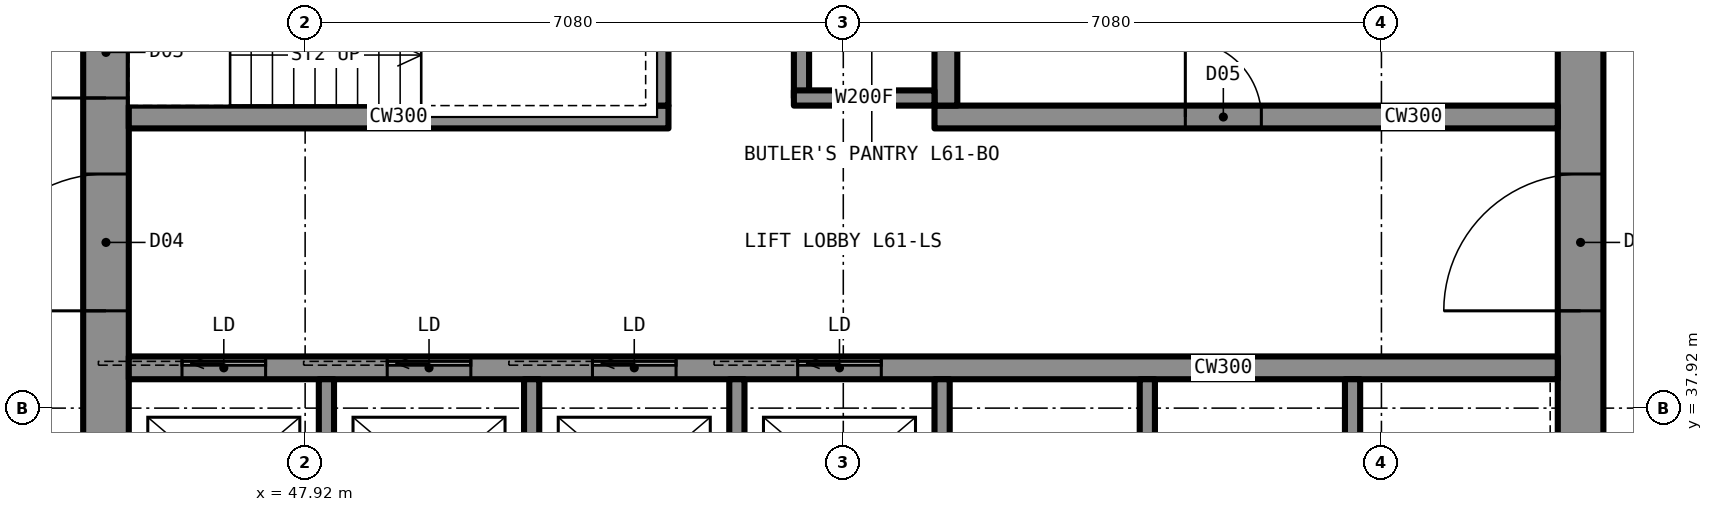
"""IFC4 building model, lengths in metres.
Left out: names, types, materials, properties, quantities, classifications, styles, units other than length and angle.
Written with IfcOpenShell. Run it as: python <this file> out.ifc"""

import sys

from ifc_helpers import new_model, si_unit, direction, frame, frame_2d, origin, place, context, subcontext, project, spatial, rectangle, extrude, element, fill, save


model = new_model("IFC4")
c1 = context("Model", 3, precision=1e-05, world=origin(), true_north=direction((0.0, 1.0)))
c2 = subcontext(c1, "Body", "Model", "MODEL_VIEW")
j1 = project(units=[si_unit("LENGTHUNIT", "METRE"), si_unit("PLANEANGLEUNIT", "RADIAN")], contexts=[c1])
p1 = place(None, origin())
s1 = spatial("IfcSite", under=j1, at=p1, CompositionType="ELEMENT")
p2 = place(p1, origin())
s2 = spatial("IfcBuilding", under=s1, at=p2, CompositionType="ELEMENT")
p3 = place(p2, frame((0.0, 0.0, 226.7)))
s3 = spatial("IfcBuildingStorey", under=s2, at=p3, CompositionType="ELEMENT", Elevation=226.7)
p4 = place(p3, frame((64.7, 35.6, 0.0), z_axis=(0.0, 0.0, 1.0), x_axis=(0.0, 1.0, 0.0)))
e1 = element("IfcWall", 1, at=p4, inside=s3, PredefinedType="SHEAR", context=c2, shape_type="SweptSolid", body=[
    extrude(rectangle(XDim=18.8, YDim=0.6, at=frame_2d((9.4, 0.0))), origin(), (0.0, 0.0, 1.0), 3.5),
])
p5 = place(p4, frame((13.4, 0.0, 0.0)))
e2 = element("IfcOpeningElement", 2, at=p5, cuts=e1, PredefinedType="OPENING", context=c2, shape_type="SweptSolid", body=[
    extrude(rectangle(XDim=1.8, YDim=2.2, at=frame_2d((0.9, 1.1))), frame((0.0, 0.31, 0.0), z_axis=(0.0, -1.0, 0.0), x_axis=(1.0, 0.0, 0.0)), (0.0, 0.0, 1.0), 0.62),
])
p6 = place(p4, frame((3.6, 0.0, 0.0)))
e3 = element("IfcOpeningElement", 3, at=p6, cuts=e1, PredefinedType="OPENING", context=c2, shape_type="SweptSolid", body=[
    extrude(rectangle(XDim=1.8, YDim=2.2, at=frame_2d((0.9, 1.1))), frame((0.0, 0.31, 0.0), z_axis=(0.0, -1.0, 0.0), x_axis=(1.0, 0.0, 0.0)), (0.0, 0.0, 1.0), 0.62),
])
p7 = place(p3, frame((45.3, 35.6, 0.0), z_axis=(0.0, 0.0, 1.0), x_axis=(0.0, 1.0, 0.0)))
e4 = element("IfcWall", 4, at=p7, inside=s3, PredefinedType="SHEAR", context=c2, shape_type="SweptSolid", body=[
    extrude(rectangle(XDim=18.8, YDim=0.6, at=frame_2d((9.4, 0.0))), origin(), (0.0, 0.0, 1.0), 3.5),
])
p8 = place(p7, frame((13.4, 0.0, 0.0)))
e5 = element("IfcOpeningElement", 5, at=p8, cuts=e4, PredefinedType="OPENING", context=c2, shape_type="SweptSolid", body=[
    extrude(rectangle(XDim=1.8, YDim=2.2, at=frame_2d((0.9, 1.1))), frame((0.0, 0.31, 0.0), z_axis=(0.0, -1.0, 0.0), x_axis=(1.0, 0.0, 0.0)), (0.0, 0.0, 1.0), 0.62),
])
p9 = place(p7, frame((3.6, 0.0, 0.0)))
e6 = element("IfcOpeningElement", 6, at=p9, cuts=e4, PredefinedType="OPENING", context=c2, shape_type="SweptSolid", body=[
    extrude(rectangle(XDim=1.8, YDim=2.2, at=frame_2d((0.9, 1.1))), frame((0.0, 0.31, 0.0), z_axis=(0.0, -1.0, 0.0), x_axis=(1.0, 0.0, 0.0)), (0.0, 0.0, 1.0), 0.62),
])
p10 = place(p7, frame((6.4, 0.0, 0.0)))
e7 = element("IfcOpeningElement", 7, at=p10, cuts=e4, PredefinedType="OPENING", context=c2, shape_type="SweptSolid", body=[
    extrude(rectangle(XDim=1.2, YDim=2.2, at=frame_2d((0.6, 1.1))), frame((0.0, 0.31, 0.0), z_axis=(0.0, -1.0, 0.0), x_axis=(1.0, 0.0, 0.0)), (0.0, 0.0, 1.0), 0.62),
])
p11 = place(p3, frame((45.6, 38.45, 0.0), z_axis=(0.0, 0.0, 1.0), x_axis=(1.0, 0.0, 0.0)))
e8 = element("IfcWall", 8, at=p11, inside=s3, PredefinedType="SHEAR", context=c2, shape_type="SweptSolid", body=[
    extrude(rectangle(XDim=18.8, YDim=0.3, at=frame_2d((9.4, 0.0))), origin(), (0.0, 0.0, 1.0), 3.5),
])
p12 = place(p11, frame((0.7, 0.0, 0.0)))
e9 = element("IfcOpeningElement", 9, at=p12, cuts=e8, PredefinedType="OPENING", context=c2, shape_type="SweptSolid", body=[
    extrude(rectangle(XDim=1.1, YDim=2.2, at=frame_2d((0.55, 1.1))), frame((0.0, 0.16, 0.0), z_axis=(0.0, -1.0, 0.0), x_axis=(1.0, 0.0, 0.0)), (0.0, 0.0, 1.0), 0.32),
])
p13 = place(p11, frame((3.4, 0.0, 0.0)))
e10 = element("IfcOpeningElement", 10, at=p13, cuts=e8, PredefinedType="OPENING", context=c2, shape_type="SweptSolid", body=[
    extrude(rectangle(XDim=1.1, YDim=2.2, at=frame_2d((0.55, 1.1))), frame((0.0, 0.16, 0.0), z_axis=(0.0, -1.0, 0.0), x_axis=(1.0, 0.0, 0.0)), (0.0, 0.0, 1.0), 0.32),
])
p14 = place(p11, frame((6.1, 0.0, 0.0)))
e11 = element("IfcOpeningElement", 11, at=p14, cuts=e8, PredefinedType="OPENING", context=c2, shape_type="SweptSolid", body=[
    extrude(rectangle(XDim=1.1, YDim=2.2, at=frame_2d((0.55, 1.1))), frame((0.0, 0.16, 0.0), z_axis=(0.0, -1.0, 0.0), x_axis=(1.0, 0.0, 0.0)), (0.0, 0.0, 1.0), 0.32),
])
p15 = place(p11, frame((8.8, 0.0, 0.0)))
e12 = element("IfcOpeningElement", 12, at=p15, cuts=e8, PredefinedType="OPENING", context=c2, shape_type="SweptSolid", body=[
    extrude(rectangle(XDim=1.1, YDim=2.2, at=frame_2d((0.55, 1.1))), frame((0.0, 0.16, 0.0), z_axis=(0.0, -1.0, 0.0), x_axis=(1.0, 0.0, 0.0)), (0.0, 0.0, 1.0), 0.32),
])
p16 = place(p3, frame((45.6, 41.75, 0.0), z_axis=(0.0, 0.0, 1.0), x_axis=(1.0, 0.0, 0.0)))
e13 = element("IfcWall", 13, at=p16, inside=s3, PredefinedType="SHEAR", context=c2, shape_type="SweptSolid", body=[
    extrude(rectangle(XDim=7.1, YDim=0.3, at=frame_2d((3.55, 0.0))), origin(), (0.0, 0.0, 1.0), 3.5),
])
p17 = place(p3, frame((56.2, 41.75, 0.0), z_axis=(0.0, 0.0, 1.0), x_axis=(1.0, 0.0, 0.0)))
e14 = element("IfcWall", 14, at=p17, inside=s3, PredefinedType="SHEAR", context=c2, shape_type="SweptSolid", body=[
    extrude(rectangle(XDim=8.2, YDim=0.3, at=frame_2d((4.1, 0.0))), origin(), (0.0, 0.0, 1.0), 3.5),
])
p18 = place(p17, frame((3.3, 0.0, 0.0)))
e15 = element("IfcOpeningElement", 15, at=p18, cuts=e14, PredefinedType="OPENING", context=c2, shape_type="SweptSolid", body=[
    extrude(rectangle(XDim=1.0, YDim=2.1, at=frame_2d((0.5, 1.05))), frame((0.0, 0.16, 0.0), z_axis=(0.0, -1.0, 0.0), x_axis=(1.0, 0.0, 0.0)), (0.0, 0.0, 1.0), 0.32),
])
p19 = place(p3, frame((52.55, 41.9, 0.0), z_axis=(0.0, 0.0, 1.0), x_axis=(0.0, 1.0, 0.0)))
e16 = element("IfcWall", 16, at=p19, inside=s3, PredefinedType="SHEAR", context=c2, shape_type="SweptSolid", body=[
    extrude(rectangle(XDim=6.2, YDim=0.3, at=frame_2d((3.1, 0.0))), origin(), (0.0, 0.0, 1.0), 3.5),
])
p20 = place(p19, frame((4.125, 0.0, 0.0)))
e17 = element("IfcOpeningElement", 17, at=p20, cuts=e16, PredefinedType="OPENING", context=c2, shape_type="SweptSolid", body=[
    extrude(rectangle(XDim=1.2, YDim=2.2, at=frame_2d((0.6, 1.1))), frame((0.0, 0.16, 0.0), z_axis=(0.0, -1.0, 0.0), x_axis=(1.0, 0.0, 0.0)), (0.0, 0.0, 1.0), 0.32),
])
p21 = place(p3, frame((56.35, 41.9, 0.0), z_axis=(0.0, 0.0, 1.0), x_axis=(0.0, 1.0, 0.0)))
e18 = element("IfcWall", 18, at=p21, inside=s3, PredefinedType="SHEAR", context=c2, shape_type="SweptSolid", body=[
    extrude(rectangle(XDim=9.5, YDim=0.3, at=frame_2d((4.75, 0.0))), origin(), (0.0, 0.0, 1.0), 3.5),
])
p22 = place(p21, frame((7.1, 0.0, 0.0)))
e19 = element("IfcOpeningElement", 19, at=p22, cuts=e18, PredefinedType="OPENING", context=c2, shape_type="SweptSolid", body=[
    extrude(rectangle(XDim=1.8, YDim=2.2, at=frame_2d((0.9, 1.1))), frame((0.0, 0.16, 0.0), z_axis=(0.0, -1.0, 0.0), x_axis=(1.0, 0.0, 0.0)), (0.0, 0.0, 1.0), 0.32),
])
p23 = place(p3, frame((54.45, 42.0, 0.0), z_axis=(0.0, 0.0, 1.0), x_axis=(0.0, 1.0, 0.0)))
e20 = element("IfcWall", 20, at=p23, inside=s3, PredefinedType="PARTITIONING", context=c2, shape_type="SweptSolid", body=[
    extrude(rectangle(XDim=2.3, YDim=0.2, at=frame_2d((1.15, 0.0))), origin(), (0.0, 0.0, 1.0), 3.33),
])
p24 = place(p23, frame((0.65, 0.0, 0.0)))
e21 = element("IfcOpeningElement", 21, at=p24, cuts=e20, PredefinedType="OPENING", context=c2, shape_type="SweptSolid", body=[
    extrude(rectangle(XDim=1.0, YDim=2.1, at=frame_2d((0.5, 1.05))), frame((0.0, 0.11, 0.0), z_axis=(0.0, -1.0, 0.0), x_axis=(1.0, 0.0, 0.0)), (0.0, 0.0, 1.0), 0.22),
])
p25 = place(p3, frame((54.35, 42.0, 0.0), z_axis=(0.0, 0.0, 1.0), x_axis=(1.0, 0.0, 0.0)))
e22 = element("IfcWall", 22, at=p25, inside=s3, PredefinedType="PARTITIONING", context=c2, shape_type="SweptSolid", body=[
    extrude(rectangle(XDim=1.85, YDim=0.2, at=frame_2d((0.925, 0.0))), origin(), (0.0, 0.0, 1.0), 3.33),
])
for number, where, z_axis, x_axis in (
    (23, (48.2, 35.6, 0.0), (0.0, 0.0, 1.0), (0.0, 1.0, 0.0)),
    (24, (50.9, 35.6, 0.0), (0.0, 0.0, 1.0), (0.0, 1.0, 0.0)),
    (25, (53.6, 35.6, 0.0), (0.0, 0.0, 1.0), (0.0, 1.0, 0.0)),
    (26, (56.3, 35.6, 0.0), (0.0, 0.0, 1.0), (0.0, 1.0, 0.0)),
    (27, (59.0, 35.6, 0.0), (0.0, 0.0, 1.0), (0.0, 1.0, 0.0)),
    (28, (61.7, 35.6, 0.0), (0.0, 0.0, 1.0), (0.0, 1.0, 0.0)),
):
    element("IfcWall", number, at=place(p3, frame(where, z_axis=z_axis, x_axis=x_axis)), inside=s3, PredefinedType="PARTITIONING", context=c2, shape_type="SweptSolid", body=[
        extrude(rectangle(XDim=2.7, YDim=0.2, at=frame_2d((1.35, 0.0))), origin(), (0.0, 0.0, 1.0), 3.33),
    ])
p26 = place(p9, origin())
e29 = element("IfcDoor", 29, at=p26, inside=s3, OperationType="DOUBLE_DOOR_SINGLE_SWING", PredefinedType="DOOR", context=c2, shape_type="SweptSolid", body=[
    extrude(rectangle(XDim=1.8, YDim=2.2, at=frame_2d((0.9, 1.1))), frame((0.0, 0.025, 0.0), z_axis=(0.0, -1.0, 0.0), x_axis=(1.0, 0.0, 0.0)), (0.0, 0.0, 1.0), 0.05),
])
fill(e6, e29)
p27 = place(p6, origin())
e30 = element("IfcDoor", 30, at=p27, inside=s3, OperationType="DOUBLE_DOOR_SINGLE_SWING", PredefinedType="DOOR", context=c2, shape_type="SweptSolid", body=[
    extrude(rectangle(XDim=1.8, YDim=2.2, at=frame_2d((0.9, 1.1))), frame((0.0, 0.025, 0.0), z_axis=(0.0, -1.0, 0.0), x_axis=(1.0, 0.0, 0.0)), (0.0, 0.0, 1.0), 0.05),
])
fill(e3, e30)
p28 = place(p10, origin())
e31 = element("IfcDoor", 31, at=p28, inside=s3, OperationType="SINGLE_SWING_LEFT", PredefinedType="DOOR", context=c2, shape_type="SweptSolid", body=[
    extrude(rectangle(XDim=1.2, YDim=2.2, at=frame_2d((0.6, 1.1))), frame((0.0, 0.025, 0.0), z_axis=(0.0, -1.0, 0.0), x_axis=(1.0, 0.0, 0.0)), (0.0, 0.0, 1.0), 0.05),
])
fill(e7, e31)
p29 = place(p18, origin())
e32 = element("IfcDoor", 32, at=p29, inside=s3, OperationType="SINGLE_SWING_LEFT", PredefinedType="DOOR", context=c2, shape_type="SweptSolid", body=[
    extrude(rectangle(XDim=1.0, YDim=2.1, at=frame_2d((0.5, 1.05))), frame((0.0, 0.025, 0.0), z_axis=(0.0, -1.0, 0.0), x_axis=(1.0, 0.0, 0.0)), (0.0, 0.0, 1.0), 0.05),
])
fill(e15, e32)
p30 = place(p12, origin())
e33 = element("IfcDoor", 33, at=p30, inside=s3, OperationType="SLIDING_TO_LEFT", PredefinedType="DOOR", context=c2, shape_type="SweptSolid", body=[
    extrude(rectangle(XDim=1.1, YDim=2.2, at=frame_2d((0.55, 1.1))), frame((0.0, 0.025, 0.0), z_axis=(0.0, -1.0, 0.0), x_axis=(1.0, 0.0, 0.0)), (0.0, 0.0, 1.0), 0.05),
])
fill(e9, e33)
p31 = place(p13, origin())
e34 = element("IfcDoor", 34, at=p31, inside=s3, OperationType="SLIDING_TO_LEFT", PredefinedType="DOOR", context=c2, shape_type="SweptSolid", body=[
    extrude(rectangle(XDim=1.1, YDim=2.2, at=frame_2d((0.55, 1.1))), frame((0.0, 0.025, 0.0), z_axis=(0.0, -1.0, 0.0), x_axis=(1.0, 0.0, 0.0)), (0.0, 0.0, 1.0), 0.05),
])
fill(e10, e34)
p32 = place(p14, origin())
e35 = element("IfcDoor", 35, at=p32, inside=s3, OperationType="SLIDING_TO_LEFT", PredefinedType="DOOR", context=c2, shape_type="SweptSolid", body=[
    extrude(rectangle(XDim=1.1, YDim=2.2, at=frame_2d((0.55, 1.1))), frame((0.0, 0.025, 0.0), z_axis=(0.0, -1.0, 0.0), x_axis=(1.0, 0.0, 0.0)), (0.0, 0.0, 1.0), 0.05),
])
fill(e11, e35)
p33 = place(p15, origin())
e36 = element("IfcDoor", 36, at=p33, inside=s3, OperationType="SLIDING_TO_LEFT", PredefinedType="DOOR", context=c2, shape_type="SweptSolid", body=[
    extrude(rectangle(XDim=1.1, YDim=2.2, at=frame_2d((0.55, 1.1))), frame((0.0, 0.025, 0.0), z_axis=(0.0, -1.0, 0.0), x_axis=(1.0, 0.0, 0.0)), (0.0, 0.0, 1.0), 0.05),
])
fill(e12, e36)
save(model, sys.argv[1])
